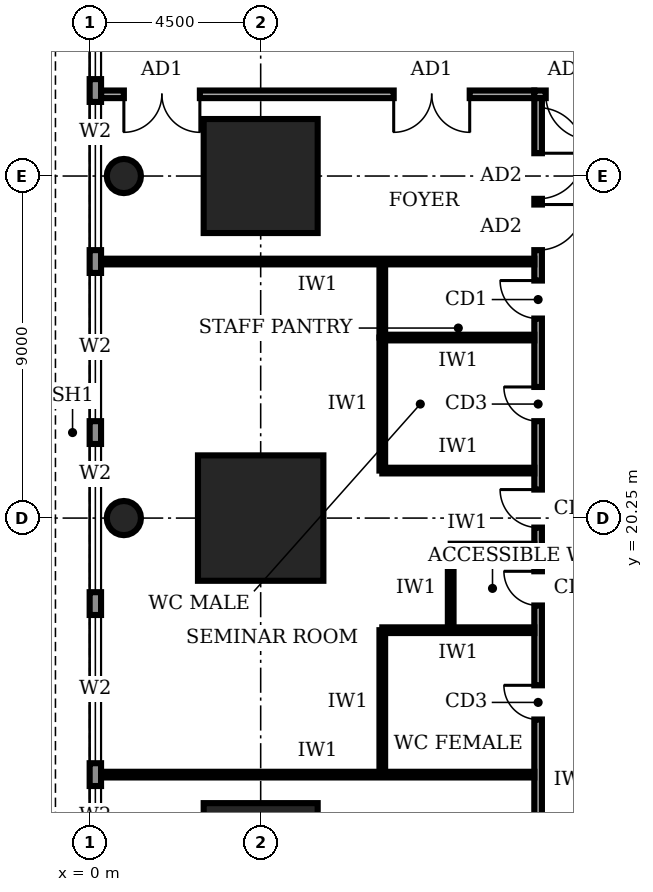
"""IFC4 building model, lengths in metres.
Left out: names, types, materials, properties, quantities, classifications, styles, units other than length and angle.
Written with IfcOpenShell. Run it as: python <this file> out.ifc"""

import sys

from ifc_helpers import new_model, si_unit, direction, frame, frame_2d, origin, origin_2d, place, context, subcontext, project, spatial, rectangle, circle, extrude, element, fill, save


model = new_model("IFC4")
c1 = context("Model", 3, precision=1e-05, world=origin(), true_north=direction((0.0, 1.0)))
c2 = subcontext(c1, "Body", "Model", "MODEL_VIEW")
j1 = project(units=[si_unit("LENGTHUNIT", "METRE"), si_unit("PLANEANGLEUNIT", "RADIAN")], contexts=[c1])
p1 = place(None, origin())
s1 = spatial("IfcSite", under=j1, at=p1, CompositionType="ELEMENT")
p2 = place(p1, origin())
s2 = spatial("IfcBuilding", under=s1, at=p2, CompositionType="ELEMENT")
p3 = place(p2, frame((0.0, 0.0, 6.0)))
s3 = spatial("IfcBuildingStorey", under=s2, at=p3, CompositionType="ELEMENT", Elevation=6.0)
p4 = place(p3, frame((4.5, 11.25, 0.0), z_axis=(0.0, 0.0, 1.0), x_axis=(1.0, 0.0, 0.0)))
e1 = element("IfcColumn", 1, at=p4, inside=s3, PredefinedType="COLUMN", context=c2, shape_type="SweptSolid", body=[
    extrude(rectangle(XDim=3.0, YDim=3.0, at=origin_2d()), origin(), (0.0, 0.0, 1.0), 5.0),
])
p5 = place(p3, frame((4.5, 20.25, 0.0), z_axis=(0.0, 0.0, 1.0), x_axis=(1.0, 0.0, 0.0)))
e2 = element("IfcColumn", 2, at=p5, inside=s3, PredefinedType="COLUMN", context=c2, shape_type="SweptSolid", body=[
    extrude(rectangle(XDim=3.3, YDim=3.3, at=origin_2d()), origin(), (0.0, 0.0, 1.0), 5.0),
])
p6 = place(p3, frame((4.5, 29.25, 0.0), z_axis=(0.0, 0.0, 1.0), x_axis=(1.0, 0.0, 0.0)))
e3 = element("IfcColumn", 3, at=p6, inside=s3, PredefinedType="COLUMN", context=c2, shape_type="SweptSolid", body=[
    extrude(rectangle(XDim=3.0, YDim=3.0, at=origin_2d()), origin(), (0.0, 0.0, 1.0), 5.0),
])
for number, where, z_axis, x_axis in (
    (4, (0.9, 20.25, 0.0), (0.0, 0.0, 1.0), (1.0, 0.0, 0.0)),
    (5, (0.9, 29.25, 0.0), (0.0, 0.0, 1.0), (1.0, 0.0, 0.0)),
):
    element("IfcColumn", number, at=place(p3, frame(where, z_axis=z_axis, x_axis=x_axis)), inside=s3, PredefinedType="COLUMN", context=c2, shape_type="SweptSolid", body=[
        extrude(circle(Radius=0.45, at=origin_2d()), origin(), (0.0, 0.0, 1.0), 5.0),
    ])
p7 = place(p3, frame((0.15, 49.48, 0.0), z_axis=(0.0, 0.0, 1.0), x_axis=(0.0, -1.0, 0.0)))
e6 = element("IfcWall", 6, at=p7, inside=s3, PredefinedType="STANDARD", context=c2, shape_type="SweptSolid", body=[
    extrude(rectangle(XDim=53.96, YDim=0.3, at=frame_2d((26.98, 0.0))), origin(), (0.0, 0.0, 1.0), 4.7),
])
p8 = place(p7, frame((49.78, 0.0, 0.6)))
e7 = element("IfcOpeningElement", 7, at=p8, cuts=e6, PredefinedType="OPENING", context=c2, shape_type="SweptSolid", body=[
    extrude(rectangle(XDim=3.9, YDim=2.6, at=frame_2d((1.95, 1.3))), frame((0.0, 0.16, 0.0), z_axis=(0.0, -1.0, 0.0), x_axis=(1.0, 0.0, 0.0)), (0.0, 0.0, 1.0), 0.32),
])
p9 = place(p7, frame((45.28, 0.0, 0.6)))
e8 = element("IfcOpeningElement", 8, at=p9, cuts=e6, PredefinedType="OPENING", context=c2, shape_type="SweptSolid", body=[
    extrude(rectangle(XDim=3.9, YDim=2.6, at=frame_2d((1.95, 1.3))), frame((0.0, 0.16, 0.0), z_axis=(0.0, -1.0, 0.0), x_axis=(1.0, 0.0, 0.0)), (0.0, 0.0, 1.0), 0.32),
])
p10 = place(p7, frame((40.78, 0.0, 0.6)))
e9 = element("IfcOpeningElement", 9, at=p10, cuts=e6, PredefinedType="OPENING", context=c2, shape_type="SweptSolid", body=[
    extrude(rectangle(XDim=3.9, YDim=2.6, at=frame_2d((1.95, 1.3))), frame((0.0, 0.16, 0.0), z_axis=(0.0, -1.0, 0.0), x_axis=(1.0, 0.0, 0.0)), (0.0, 0.0, 1.0), 0.32),
])
p11 = place(p7, frame((36.28, 0.0, 0.6)))
e10 = element("IfcOpeningElement", 10, at=p11, cuts=e6, PredefinedType="OPENING", context=c2, shape_type="SweptSolid", body=[
    extrude(rectangle(XDim=3.9, YDim=2.6, at=frame_2d((1.95, 1.3))), frame((0.0, 0.16, 0.0), z_axis=(0.0, -1.0, 0.0), x_axis=(1.0, 0.0, 0.0)), (0.0, 0.0, 1.0), 0.32),
])
p12 = place(p7, frame((31.78, 0.0, 0.6)))
e11 = element("IfcOpeningElement", 11, at=p12, cuts=e6, PredefinedType="OPENING", context=c2, shape_type="SweptSolid", body=[
    extrude(rectangle(XDim=3.9, YDim=2.6, at=frame_2d((1.95, 1.3))), frame((0.0, 0.16, 0.0), z_axis=(0.0, -1.0, 0.0), x_axis=(1.0, 0.0, 0.0)), (0.0, 0.0, 1.0), 0.32),
])
p13 = place(p7, frame((27.28, 0.0, 0.6)))
e12 = element("IfcOpeningElement", 12, at=p13, cuts=e6, PredefinedType="OPENING", context=c2, shape_type="SweptSolid", body=[
    extrude(rectangle(XDim=3.9, YDim=2.6, at=frame_2d((1.95, 1.3))), frame((0.0, 0.16, 0.0), z_axis=(0.0, -1.0, 0.0), x_axis=(1.0, 0.0, 0.0)), (0.0, 0.0, 1.0), 0.32),
])
p14 = place(p7, frame((22.78, 0.0, 0.6)))
e13 = element("IfcOpeningElement", 13, at=p14, cuts=e6, PredefinedType="OPENING", context=c2, shape_type="SweptSolid", body=[
    extrude(rectangle(XDim=3.9, YDim=2.6, at=frame_2d((1.95, 1.3))), frame((0.0, 0.16, 0.0), z_axis=(0.0, -1.0, 0.0), x_axis=(1.0, 0.0, 0.0)), (0.0, 0.0, 1.0), 0.32),
])
p15 = place(p7, frame((18.28, 0.0, 0.6)))
e14 = element("IfcOpeningElement", 14, at=p15, cuts=e6, PredefinedType="OPENING", context=c2, shape_type="SweptSolid", body=[
    extrude(rectangle(XDim=3.9, YDim=2.6, at=frame_2d((1.95, 1.3))), frame((0.0, 0.16, 0.0), z_axis=(0.0, -1.0, 0.0), x_axis=(1.0, 0.0, 0.0)), (0.0, 0.0, 1.0), 0.32),
])
p16 = place(p7, frame((13.78, 0.0, 0.6)))
e15 = element("IfcOpeningElement", 15, at=p16, cuts=e6, PredefinedType="OPENING", context=c2, shape_type="SweptSolid", body=[
    extrude(rectangle(XDim=3.9, YDim=2.6, at=frame_2d((1.95, 1.3))), frame((0.0, 0.16, 0.0), z_axis=(0.0, -1.0, 0.0), x_axis=(1.0, 0.0, 0.0)), (0.0, 0.0, 1.0), 0.32),
])
p17 = place(p7, frame((9.28, 0.0, 0.6)))
e16 = element("IfcOpeningElement", 16, at=p17, cuts=e6, PredefinedType="OPENING", context=c2, shape_type="SweptSolid", body=[
    extrude(rectangle(XDim=3.9, YDim=2.6, at=frame_2d((1.95, 1.3))), frame((0.0, 0.16, 0.0), z_axis=(0.0, -1.0, 0.0), x_axis=(1.0, 0.0, 0.0)), (0.0, 0.0, 1.0), 0.32),
])
p18 = place(p7, frame((4.78, 0.0, 0.6)))
e17 = element("IfcOpeningElement", 17, at=p18, cuts=e6, PredefinedType="OPENING", context=c2, shape_type="SweptSolid", body=[
    extrude(rectangle(XDim=3.9, YDim=2.6, at=frame_2d((1.95, 1.3))), frame((0.0, 0.16, 0.0), z_axis=(0.0, -1.0, 0.0), x_axis=(1.0, 0.0, 0.0)), (0.0, 0.0, 1.0), 0.32),
])
p19 = place(p3, frame((28.6, 31.4, 0.0), z_axis=(0.0, 0.0, 1.0), x_axis=(-1.0, 0.0, 0.0)))
e18 = element("IfcWall", 18, at=p19, inside=s3, PredefinedType="SOLIDWALL", context=c2, shape_type="SweptSolid", body=[
    extrude(rectangle(XDim=16.9, YDim=0.2, at=frame_2d((8.45, 0.0))), origin(), (0.0, 0.0, 1.0), 4.7),
])
p20 = place(p19, frame((15.4, 0.0, 0.0)))
e19 = element("IfcOpeningElement", 19, at=p20, cuts=e18, PredefinedType="OPENING", context=c2, shape_type="SweptSolid", body=[
    extrude(rectangle(XDim=1.2, YDim=2.4, at=frame_2d((0.6, 1.2))), frame((0.0, 0.11, 0.0), z_axis=(0.0, -1.0, 0.0), x_axis=(1.0, 0.0, 0.0)), (0.0, 0.0, 1.0), 0.22),
])
p21 = place(p19, frame((12.35, 0.0, 0.0)))
e20 = element("IfcOpeningElement", 20, at=p21, cuts=e18, PredefinedType="OPENING", context=c2, shape_type="SweptSolid", body=[
    extrude(rectangle(XDim=1.0, YDim=2.1, at=frame_2d((0.5, 1.05))), frame((0.0, 0.11, 0.0), z_axis=(0.0, -1.0, 0.0), x_axis=(1.0, 0.0, 0.0)), (0.0, 0.0, 1.0), 0.22),
])
p22 = place(p19, frame((7.85, 0.0, 0.0)))
e21 = element("IfcOpeningElement", 21, at=p22, cuts=e18, PredefinedType="OPENING", context=c2, shape_type="SweptSolid", body=[
    extrude(rectangle(XDim=1.0, YDim=2.1, at=frame_2d((0.5, 1.05))), frame((0.0, 0.11, 0.0), z_axis=(0.0, -1.0, 0.0), x_axis=(1.0, 0.0, 0.0)), (0.0, 0.0, 1.0), 0.22),
])
p23 = place(p19, frame((0.275, 0.0, 0.0)))
e22 = element("IfcOpeningElement", 22, at=p23, cuts=e18, PredefinedType="OPENING", context=c2, shape_type="SweptSolid", body=[
    extrude(rectangle(XDim=1.0, YDim=2.1, at=frame_2d((0.5, 1.05))), frame((0.0, 0.11, 0.0), z_axis=(0.0, -1.0, 0.0), x_axis=(1.0, 0.0, 0.0)), (0.0, 0.0, 1.0), 0.22),
])
p24 = place(p19, frame((3.35, 0.0, 0.0)))
e23 = element("IfcOpeningElement", 23, at=p24, cuts=e18, PredefinedType="OPENING", context=c2, shape_type="SweptSolid", body=[
    extrude(rectangle(XDim=1.0, YDim=2.1, at=frame_2d((0.5, 1.05))), frame((0.0, 0.11, 0.0), z_axis=(0.0, -1.0, 0.0), x_axis=(1.0, 0.0, 0.0)), (0.0, 0.0, 1.0), 0.22),
])
p25 = place(p3, frame((11.8, 31.3, 0.0), z_axis=(0.0, 0.0, 1.0), x_axis=(0.0, -1.0, 0.0)))
e24 = element("IfcWall", 24, at=p25, inside=s3, PredefinedType="SOLIDWALL", context=c2, shape_type="SweptSolid", body=[
    extrude(rectangle(XDim=22.3, YDim=0.2, at=frame_2d((11.15, 0.0))), origin(), (0.0, 0.0, 1.0), 4.7),
])
p26 = place(p25, frame((19.55, 0.0, 0.0)))
e25 = element("IfcOpeningElement", 25, at=p26, cuts=e24, PredefinedType="OPENING", context=c2, shape_type="SweptSolid", body=[
    extrude(rectangle(XDim=1.0, YDim=2.1, at=frame_2d((0.5, 1.05))), frame((0.0, 0.11, 0.0), z_axis=(0.0, -1.0, 0.0), x_axis=(1.0, 0.0, 0.0)), (0.0, 0.0, 1.0), 0.22),
])
p27 = place(p25, frame((15.45, 0.0, 0.0)))
e26 = element("IfcOpeningElement", 26, at=p27, cuts=e24, PredefinedType="OPENING", context=c2, shape_type="SweptSolid", body=[
    extrude(rectangle(XDim=0.9, YDim=2.1, at=frame_2d((0.45, 1.05))), frame((0.0, 0.11, 0.0), z_axis=(0.0, -1.0, 0.0), x_axis=(1.0, 0.0, 0.0)), (0.0, 0.0, 1.0), 0.22),
])
p28 = place(p25, frame((12.45, 0.0, 0.0)))
e27 = element("IfcOpeningElement", 27, at=p28, cuts=e24, PredefinedType="OPENING", context=c2, shape_type="SweptSolid", body=[
    extrude(rectangle(XDim=0.9, YDim=2.1, at=frame_2d((0.45, 1.05))), frame((0.0, 0.11, 0.0), z_axis=(0.0, -1.0, 0.0), x_axis=(1.0, 0.0, 0.0)), (0.0, 0.0, 1.0), 0.22),
])
p29 = place(p25, frame((7.6, 0.0, 0.0)))
e28 = element("IfcOpeningElement", 28, at=p29, cuts=e24, PredefinedType="OPENING", context=c2, shape_type="SweptSolid", body=[
    extrude(rectangle(XDim=0.9, YDim=2.1, at=frame_2d((0.45, 1.05))), frame((0.0, 0.11, 0.0), z_axis=(0.0, -1.0, 0.0), x_axis=(1.0, 0.0, 0.0)), (0.0, 0.0, 1.0), 0.22),
])
p30 = place(p25, frame((4.8, 0.0, 0.0)))
e29 = element("IfcOpeningElement", 29, at=p30, cuts=e24, PredefinedType="OPENING", context=c2, shape_type="SweptSolid", body=[
    extrude(rectangle(XDim=1.0, YDim=2.1, at=frame_2d((0.5, 1.05))), frame((0.0, 0.11, 0.0), z_axis=(0.0, -1.0, 0.0), x_axis=(1.0, 0.0, 0.0)), (0.0, 0.0, 1.0), 0.22),
])
p31 = place(p25, frame((10.3, 0.0, 0.0)))
e30 = element("IfcOpeningElement", 30, at=p31, cuts=e24, PredefinedType="OPENING", context=c2, shape_type="SweptSolid", body=[
    extrude(rectangle(XDim=1.0, YDim=2.1, at=frame_2d((0.5, 1.05))), frame((0.0, 0.11, 0.0), z_axis=(0.0, -1.0, 0.0), x_axis=(1.0, 0.0, 0.0)), (0.0, 0.0, 1.0), 0.22),
])
p32 = place(p25, frame((2.8, 0.0, 0.0)))
e31 = element("IfcOpeningElement", 31, at=p32, cuts=e24, PredefinedType="OPENING", context=c2, shape_type="SweptSolid", body=[
    extrude(rectangle(XDim=1.2, YDim=2.4, at=frame_2d((0.6, 1.2))), frame((0.0, 0.11, 0.0), z_axis=(0.0, -1.0, 0.0), x_axis=(1.0, 0.0, 0.0)), (0.0, 0.0, 1.0), 0.22),
])
p33 = place(p25, frame((1.45, 0.0, 0.0)))
e32 = element("IfcOpeningElement", 32, at=p33, cuts=e24, PredefinedType="OPENING", context=c2, shape_type="SweptSolid", body=[
    extrude(rectangle(XDim=1.2, YDim=2.4, at=frame_2d((0.6, 1.2))), frame((0.0, 0.11, 0.0), z_axis=(0.0, -1.0, 0.0), x_axis=(1.0, 0.0, 0.0)), (0.0, 0.0, 1.0), 0.22),
])
p34 = place(p3, frame((0.3, 31.4, 0.0), z_axis=(0.0, 0.0, 1.0), x_axis=(1.0, 0.0, 0.0)))
e33 = element("IfcWall", 33, at=p34, inside=s3, PredefinedType="SOLIDWALL", context=c2, shape_type="SweptSolid", body=[
    extrude(rectangle(XDim=11.4, YDim=0.2, at=frame_2d((5.7, 0.0))), origin(), (0.0, 0.0, 1.0), 4.7),
])
p35 = place(p34, frame((0.6, 0.0, 0.0)))
e34 = element("IfcOpeningElement", 34, at=p35, cuts=e33, PredefinedType="OPENING", context=c2, shape_type="SweptSolid", body=[
    extrude(rectangle(XDim=2.0, YDim=2.4, at=frame_2d((1.0, 1.2))), frame((0.0, 0.11, 0.0), z_axis=(0.0, -1.0, 0.0), x_axis=(1.0, 0.0, 0.0)), (0.0, 0.0, 1.0), 0.22),
])
p36 = place(p34, frame((7.7, 0.0, 0.0)))
e35 = element("IfcOpeningElement", 35, at=p36, cuts=e33, PredefinedType="OPENING", context=c2, shape_type="SweptSolid", body=[
    extrude(rectangle(XDim=2.0, YDim=2.4, at=frame_2d((1.0, 1.2))), frame((0.0, 0.11, 0.0), z_axis=(0.0, -1.0, 0.0), x_axis=(1.0, 0.0, 0.0)), (0.0, 0.0, 1.0), 0.22),
])
for number, where, z_axis, x_axis in (
    (36, (0.3, 13.5, 0.0), (0.0, 0.0, 1.0), (1.0, 0.0, 0.0)),
    (37, (0.3, 27.0, 0.0), (0.0, 0.0, 1.0), (1.0, 0.0, 0.0)),
):
    element("IfcWall", number, at=place(p3, frame(where, z_axis=z_axis, x_axis=x_axis)), inside=s3, PredefinedType="PARTITIONING", context=c2, shape_type="SweptSolid", body=[
        extrude(rectangle(XDim=11.4, YDim=0.15, at=frame_2d((5.7, 0.0))), origin(), (0.0, 0.0, 1.0), 4.7),
    ])
p37 = place(p3, frame((11.7, 17.3, 0.0), z_axis=(0.0, 0.0, 1.0), x_axis=(-1.0, 0.0, 0.0)))
e38 = element("IfcWall", 38, at=p37, inside=s3, PredefinedType="PARTITIONING", context=c2, shape_type="SweptSolid", body=[
    extrude(rectangle(XDim=4.0, YDim=0.15, at=frame_2d((2.0, 0.0))), origin(), (0.0, 0.0, 1.0), 4.7),
])
p38 = place(p3, frame((11.7, 19.5, 0.0), z_axis=(0.0, 0.0, 1.0), x_axis=(-1.0, 0.0, 0.0)))
e39 = element("IfcWall", 39, at=p38, inside=s3, PredefinedType="PARTITIONING", context=c2, shape_type="SweptSolid", body=[
    extrude(rectangle(XDim=2.2, YDim=0.15, at=frame_2d((1.1, 0.0))), origin(), (0.0, 0.0, 1.0), 4.7),
])
for number, where, z_axis, x_axis in (
    (40, (11.7, 21.5, 0.0), (0.0, 0.0, 1.0), (-1.0, 0.0, 0.0)),
    (41, (11.7, 25.0, 0.0), (0.0, 0.0, 1.0), (-1.0, 0.0, 0.0)),
):
    element("IfcWall", number, at=place(p3, frame(where, z_axis=z_axis, x_axis=x_axis)), inside=s3, PredefinedType="PARTITIONING", context=c2, shape_type="SweptSolid", body=[
        extrude(rectangle(XDim=4.0, YDim=0.15, at=frame_2d((2.0, 0.0))), origin(), (0.0, 0.0, 1.0), 4.7),
    ])
p39 = place(p3, frame((7.7, 13.5, 0.0), z_axis=(0.0, 0.0, 1.0), x_axis=(0.0, 1.0, 0.0)))
e42 = element("IfcWall", 42, at=p39, inside=s3, PredefinedType="PARTITIONING", context=c2, shape_type="SweptSolid", body=[
    extrude(rectangle(XDim=3.8, YDim=0.15, at=frame_2d((1.9, 0.0))), origin(), (0.0, 0.0, 1.0), 4.7),
])
p40 = place(p3, frame((9.5, 17.3, 0.0), z_axis=(0.0, 0.0, 1.0), x_axis=(0.0, 1.0, 0.0)))
e43 = element("IfcWall", 43, at=p40, inside=s3, PredefinedType="PARTITIONING", context=c2, shape_type="SweptSolid", body=[
    extrude(rectangle(XDim=2.2, YDim=0.15, at=frame_2d((1.1, 0.0))), origin(), (0.0, 0.0, 1.0), 4.7),
])
p41 = place(p3, frame((7.7, 21.5, 0.0), z_axis=(0.0, 0.0, 1.0), x_axis=(0.0, 1.0, 0.0)))
e44 = element("IfcWall", 44, at=p41, inside=s3, PredefinedType="PARTITIONING", context=c2, shape_type="SweptSolid", body=[
    extrude(rectangle(XDim=3.5, YDim=0.15, at=frame_2d((1.75, 0.0))), origin(), (0.0, 0.0, 1.0), 4.7),
])
p42 = place(p3, frame((7.7, 25.0, 0.0), z_axis=(0.0, 0.0, 1.0), x_axis=(0.0, 1.0, 0.0)))
e45 = element("IfcWall", 45, at=p42, inside=s3, PredefinedType="PARTITIONING", context=c2, shape_type="SweptSolid", body=[
    extrude(rectangle(XDim=2.0, YDim=0.15, at=frame_2d((1.0, 0.0))), origin(), (0.0, 0.0, 1.0), 4.7),
])
p43 = place(p11, origin())
e46 = element("IfcWindow", 46, at=p43, inside=s3, PartitioningType="SINGLE_PANEL", PredefinedType="WINDOW", context=c2, shape_type="SweptSolid", body=[
    extrude(rectangle(XDim=3.9, YDim=2.6, at=frame_2d((1.95, 1.3))), frame((0.0, 0.03, 0.0), z_axis=(0.0, -1.0, 0.0), x_axis=(1.0, 0.0, 0.0)), (0.0, 0.0, 1.0), 0.06),
])
fill(e10, e46)
p44 = place(p12, origin())
e47 = element("IfcWindow", 47, at=p44, inside=s3, PartitioningType="SINGLE_PANEL", PredefinedType="WINDOW", context=c2, shape_type="SweptSolid", body=[
    extrude(rectangle(XDim=3.9, YDim=2.6, at=frame_2d((1.95, 1.3))), frame((0.0, 0.03, 0.0), z_axis=(0.0, -1.0, 0.0), x_axis=(1.0, 0.0, 0.0)), (0.0, 0.0, 1.0), 0.06),
])
fill(e11, e47)
p45 = place(p13, origin())
e48 = element("IfcWindow", 48, at=p45, inside=s3, PartitioningType="SINGLE_PANEL", PredefinedType="WINDOW", context=c2, shape_type="SweptSolid", body=[
    extrude(rectangle(XDim=3.9, YDim=2.6, at=frame_2d((1.95, 1.3))), frame((0.0, 0.03, 0.0), z_axis=(0.0, -1.0, 0.0), x_axis=(1.0, 0.0, 0.0)), (0.0, 0.0, 1.0), 0.06),
])
fill(e12, e48)
p46 = place(p14, origin())
e49 = element("IfcWindow", 49, at=p46, inside=s3, PartitioningType="SINGLE_PANEL", PredefinedType="WINDOW", context=c2, shape_type="SweptSolid", body=[
    extrude(rectangle(XDim=3.9, YDim=2.6, at=frame_2d((1.95, 1.3))), frame((0.0, 0.03, 0.0), z_axis=(0.0, -1.0, 0.0), x_axis=(1.0, 0.0, 0.0)), (0.0, 0.0, 1.0), 0.06),
])
fill(e13, e49)
p47 = place(p15, origin())
e50 = element("IfcWindow", 50, at=p47, inside=s3, PartitioningType="SINGLE_PANEL", PredefinedType="WINDOW", context=c2, shape_type="SweptSolid", body=[
    extrude(rectangle(XDim=3.9, YDim=2.6, at=frame_2d((1.95, 1.3))), frame((0.0, 0.03, 0.0), z_axis=(0.0, -1.0, 0.0), x_axis=(1.0, 0.0, 0.0)), (0.0, 0.0, 1.0), 0.06),
])
fill(e14, e50)
p48 = place(p16, origin())
e51 = element("IfcWindow", 51, at=p48, inside=s3, PartitioningType="SINGLE_PANEL", PredefinedType="WINDOW", context=c2, shape_type="SweptSolid", body=[
    extrude(rectangle(XDim=3.9, YDim=2.6, at=frame_2d((1.95, 1.3))), frame((0.0, 0.03, 0.0), z_axis=(0.0, -1.0, 0.0), x_axis=(1.0, 0.0, 0.0)), (0.0, 0.0, 1.0), 0.06),
])
fill(e15, e51)
p49 = place(p20, origin())
e52 = element("IfcDoor", 52, at=p49, inside=s3, OperationType="SINGLE_SWING_LEFT", PredefinedType="DOOR", context=c2, shape_type="SweptSolid", body=[
    extrude(rectangle(XDim=1.2, YDim=2.4, at=frame_2d((0.6, 1.2))), frame((0.0, 0.025, 0.0), z_axis=(0.0, -1.0, 0.0), x_axis=(1.0, 0.0, 0.0)), (0.0, 0.0, 1.0), 0.05),
])
fill(e19, e52)
p50 = place(p27, frame((0.9, 0.0, 0.0), z_axis=(0.0, 0.0, 1.0), x_axis=(-1.0, 0.0, 0.0)))
e53 = element("IfcDoor", 53, at=p50, inside=s3, OperationType="SINGLE_SWING_RIGHT", PredefinedType="DOOR", context=c2, shape_type="SweptSolid", body=[
    extrude(rectangle(XDim=0.9, YDim=2.1, at=frame_2d((0.45, 1.05))), frame((0.0, 0.025, 0.0), z_axis=(0.0, -1.0, 0.0), x_axis=(1.0, 0.0, 0.0)), (0.0, 0.0, 1.0), 0.05),
])
fill(e26, e53)
p51 = place(p28, frame((0.9, 0.0, 0.0), z_axis=(0.0, 0.0, 1.0), x_axis=(-1.0, 0.0, 0.0)))
e54 = element("IfcDoor", 54, at=p51, inside=s3, OperationType="SINGLE_SWING_RIGHT", PredefinedType="DOOR", context=c2, shape_type="SweptSolid", body=[
    extrude(rectangle(XDim=0.9, YDim=2.1, at=frame_2d((0.45, 1.05))), frame((0.0, 0.025, 0.0), z_axis=(0.0, -1.0, 0.0), x_axis=(1.0, 0.0, 0.0)), (0.0, 0.0, 1.0), 0.05),
])
fill(e27, e54)
p52 = place(p29, frame((0.9, 0.0, 0.0), z_axis=(0.0, 0.0, 1.0), x_axis=(-1.0, 0.0, 0.0)))
e55 = element("IfcDoor", 55, at=p52, inside=s3, OperationType="SINGLE_SWING_RIGHT", PredefinedType="DOOR", context=c2, shape_type="SweptSolid", body=[
    extrude(rectangle(XDim=0.9, YDim=2.1, at=frame_2d((0.45, 1.05))), frame((0.0, 0.025, 0.0), z_axis=(0.0, -1.0, 0.0), x_axis=(1.0, 0.0, 0.0)), (0.0, 0.0, 1.0), 0.05),
])
fill(e28, e55)
p53 = place(p30, frame((1.0, 0.0, 0.0), z_axis=(0.0, 0.0, 1.0), x_axis=(-1.0, 0.0, 0.0)))
e56 = element("IfcDoor", 56, at=p53, inside=s3, OperationType="SINGLE_SWING_RIGHT", PredefinedType="DOOR", context=c2, shape_type="SweptSolid", body=[
    extrude(rectangle(XDim=1.0, YDim=2.1, at=frame_2d((0.5, 1.05))), frame((0.0, 0.025, 0.0), z_axis=(0.0, -1.0, 0.0), x_axis=(1.0, 0.0, 0.0)), (0.0, 0.0, 1.0), 0.05),
])
fill(e29, e56)
p54 = place(p31, frame((1.0, 0.0, 0.0), z_axis=(0.0, 0.0, 1.0), x_axis=(-1.0, 0.0, 0.0)))
e57 = element("IfcDoor", 57, at=p54, inside=s3, OperationType="SINGLE_SWING_RIGHT", PredefinedType="DOOR", context=c2, shape_type="SweptSolid", body=[
    extrude(rectangle(XDim=1.0, YDim=2.1, at=frame_2d((0.5, 1.05))), frame((0.0, 0.025, 0.0), z_axis=(0.0, -1.0, 0.0), x_axis=(1.0, 0.0, 0.0)), (0.0, 0.0, 1.0), 0.05),
])
fill(e30, e57)
p55 = place(p32, origin())
e58 = element("IfcDoor", 58, at=p55, inside=s3, OperationType="SINGLE_SWING_LEFT", PredefinedType="DOOR", context=c2, shape_type="SweptSolid", body=[
    extrude(rectangle(XDim=1.2, YDim=2.4, at=frame_2d((0.6, 1.2))), frame((0.0, 0.025, 0.0), z_axis=(0.0, -1.0, 0.0), x_axis=(1.0, 0.0, 0.0)), (0.0, 0.0, 1.0), 0.05),
])
fill(e31, e58)
p56 = place(p33, origin())
e59 = element("IfcDoor", 59, at=p56, inside=s3, OperationType="SINGLE_SWING_LEFT", PredefinedType="DOOR", context=c2, shape_type="SweptSolid", body=[
    extrude(rectangle(XDim=1.2, YDim=2.4, at=frame_2d((0.6, 1.2))), frame((0.0, 0.025, 0.0), z_axis=(0.0, -1.0, 0.0), x_axis=(1.0, 0.0, 0.0)), (0.0, 0.0, 1.0), 0.05),
])
fill(e32, e59)
p57 = place(p35, frame((2.0, 0.0, 0.0), z_axis=(0.0, 0.0, 1.0), x_axis=(-1.0, 0.0, 0.0)))
e60 = element("IfcDoor", 60, at=p57, inside=s3, OperationType="DOUBLE_DOOR_SINGLE_SWING", PredefinedType="DOOR", context=c2, shape_type="SweptSolid", body=[
    extrude(rectangle(XDim=2.0, YDim=2.4, at=frame_2d((1.0, 1.2))), frame((0.0, 0.025, 0.0), z_axis=(0.0, -1.0, 0.0), x_axis=(1.0, 0.0, 0.0)), (0.0, 0.0, 1.0), 0.05),
])
fill(e34, e60)
p58 = place(p36, frame((2.0, 0.0, 0.0), z_axis=(0.0, 0.0, 1.0), x_axis=(-1.0, 0.0, 0.0)))
e61 = element("IfcDoor", 61, at=p58, inside=s3, OperationType="DOUBLE_DOOR_SINGLE_SWING", PredefinedType="DOOR", context=c2, shape_type="SweptSolid", body=[
    extrude(rectangle(XDim=2.0, YDim=2.4, at=frame_2d((1.0, 1.2))), frame((0.0, 0.025, 0.0), z_axis=(0.0, -1.0, 0.0), x_axis=(1.0, 0.0, 0.0)), (0.0, 0.0, 1.0), 0.05),
])
fill(e35, e61)
save(model, sys.argv[1])
